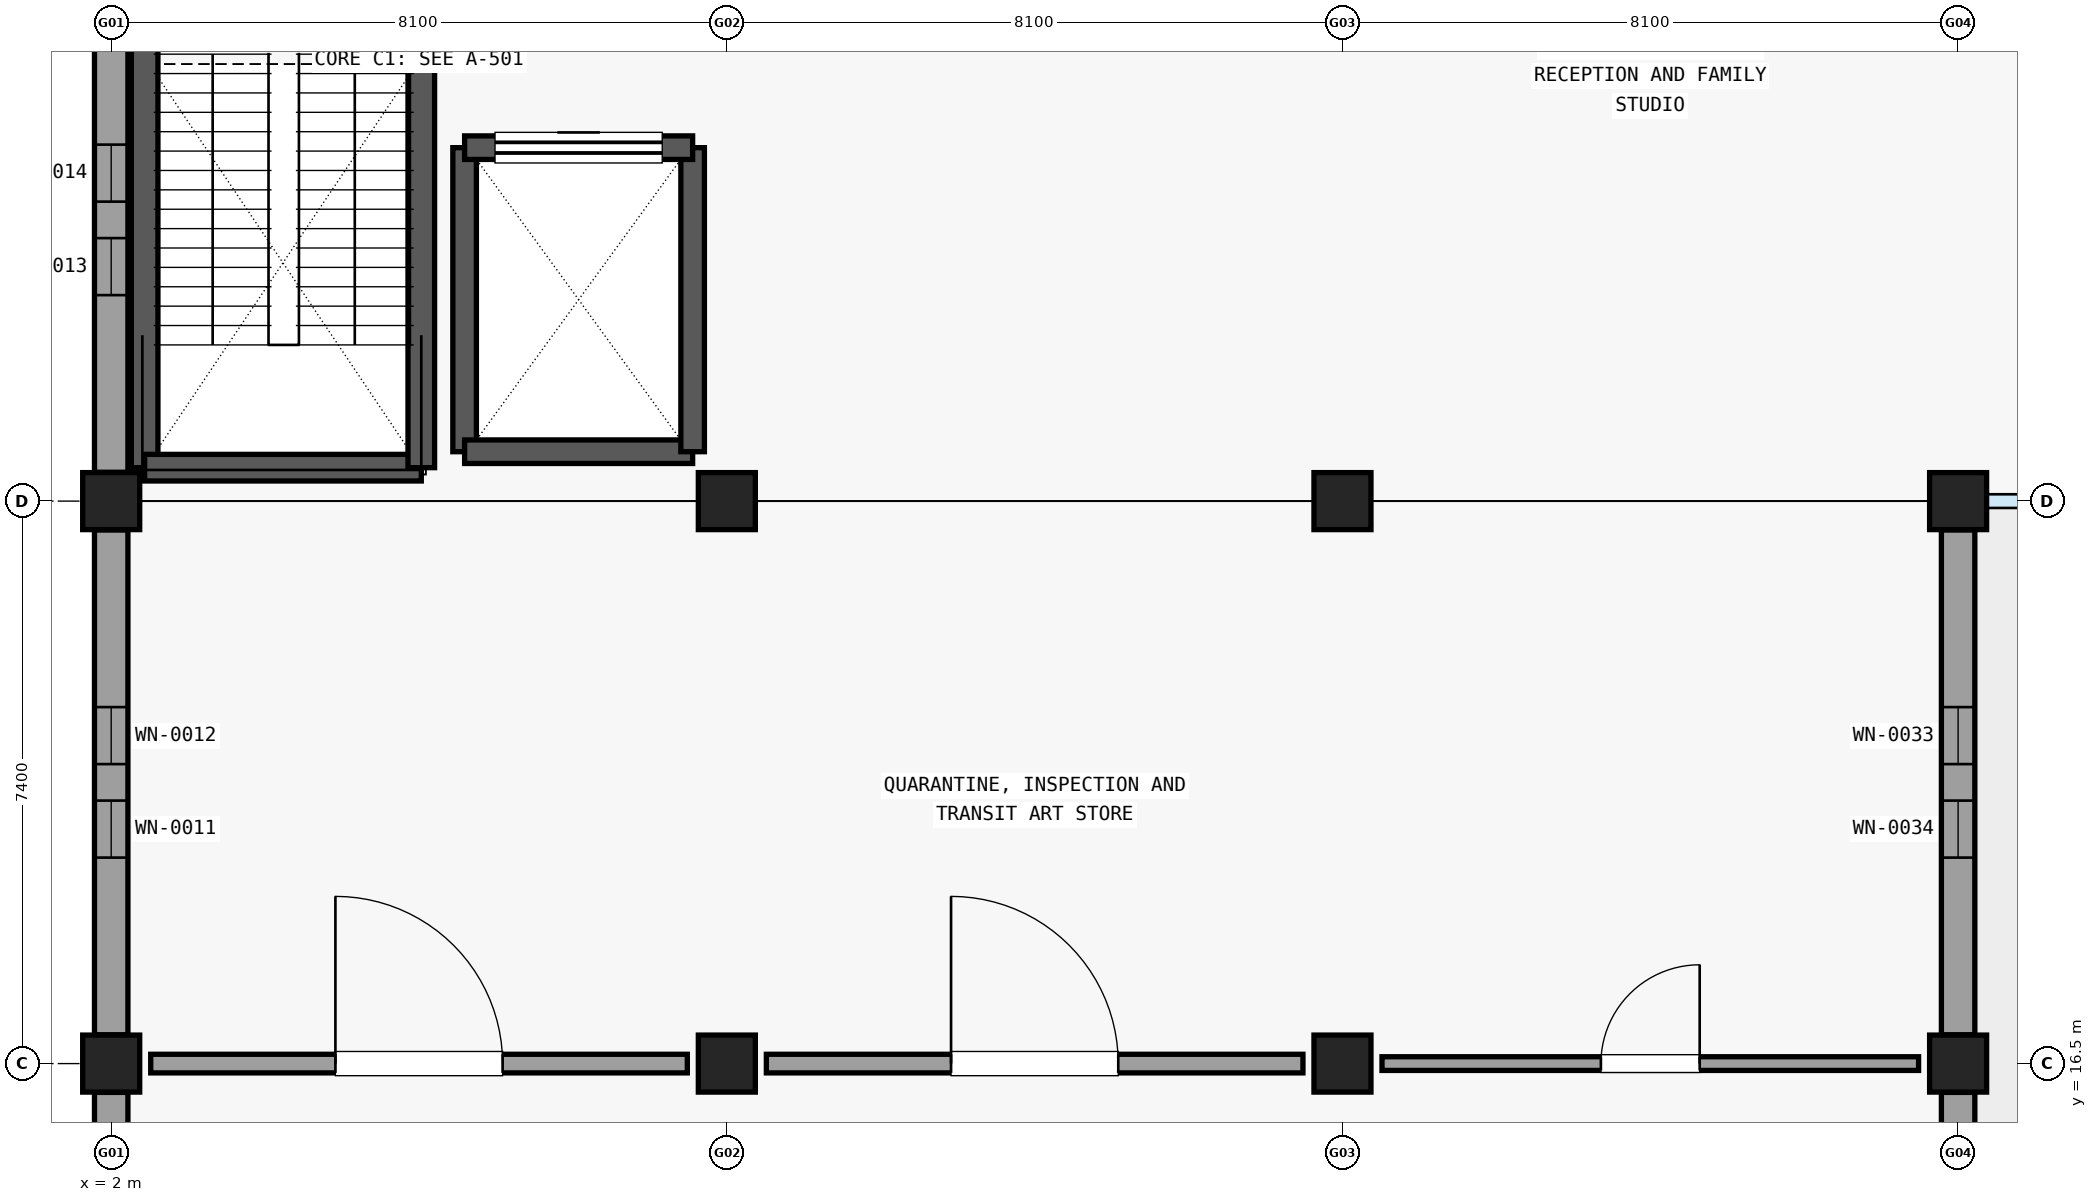
"""IFC4 building model, lengths in metres.
Left out: names, types, materials, properties, quantities, classifications, styles, units other than length and angle.
Written with IfcOpenShell. Run it as: python <this file> out.ifc"""

import sys

from ifc_helpers import new_model, si_unit, direction, frame, frame_2d, origin, origin_2d, place, context, subcontext, project, spatial, rectangle, extrude, element, fill, save


model = new_model("IFC4")
c1 = context("Model", 3, precision=1e-05, world=origin(), true_north=direction((0.0, 1.0)))
c2 = subcontext(c1, "Body", "Model", "MODEL_VIEW")
j1 = project(units=[si_unit("LENGTHUNIT", "METRE"), si_unit("PLANEANGLEUNIT", "RADIAN")], contexts=[c1])
p1 = place(None, origin())
s1 = spatial("IfcSite", under=j1, at=p1, CompositionType="ELEMENT")
p2 = place(p1, origin())
s2 = spatial("IfcBuilding", under=s1, at=p2, CompositionType="ELEMENT")
p3 = place(p2, origin())
s3 = spatial("IfcBuildingStorey", under=s2, at=p3, CompositionType="ELEMENT", Elevation=0.0)
p4 = place(p3, frame((2.0, 16.5, -0.28), z_axis=(0.0, 0.0, 1.0), x_axis=(1.0, 0.0, 0.0)))
e1 = element("IfcColumn", 1, at=p4, inside=s3, PredefinedType="COLUMN", context=c2, shape_type="SweptSolid", body=[
    extrude(rectangle(XDim=0.75, YDim=0.75, at=origin_2d()), origin(), (0.0, 0.0, 1.0), 5.415),
])
p5 = place(p3, frame((2.0, 23.9, 0.0), z_axis=(0.0, 0.0, 1.0), x_axis=(1.0, 0.0, 0.0)))
e2 = element("IfcColumn", 2, at=p5, inside=s3, PredefinedType="COLUMN", context=c2, shape_type="SweptSolid", body=[
    extrude(rectangle(XDim=0.75, YDim=0.75, at=origin_2d()), origin(), (0.0, 0.0, 1.0), 5.135),
])
p6 = place(p3, frame((10.1, 16.5, -0.28), z_axis=(0.0, 0.0, 1.0), x_axis=(1.0, 0.0, 0.0)))
e3 = element("IfcColumn", 3, at=p6, inside=s3, PredefinedType="COLUMN", context=c2, shape_type="SweptSolid", body=[
    extrude(rectangle(XDim=0.75, YDim=0.75, at=origin_2d()), origin(), (0.0, 0.0, 1.0), 5.415),
])
p7 = place(p3, frame((10.1, 23.9, 0.0), z_axis=(0.0, 0.0, 1.0), x_axis=(1.0, 0.0, 0.0)))
e4 = element("IfcColumn", 4, at=p7, inside=s3, PredefinedType="COLUMN", context=c2, shape_type="SweptSolid", body=[
    extrude(rectangle(XDim=0.75, YDim=0.75, at=origin_2d()), origin(), (0.0, 0.0, 1.0), 5.135),
])
p8 = place(p3, frame((18.2, 16.5, -0.28), z_axis=(0.0, 0.0, 1.0), x_axis=(1.0, 0.0, 0.0)))
e5 = element("IfcColumn", 5, at=p8, inside=s3, PredefinedType="COLUMN", context=c2, shape_type="SweptSolid", body=[
    extrude(rectangle(XDim=0.75, YDim=0.75, at=origin_2d()), origin(), (0.0, 0.0, 1.0), 5.415),
])
p9 = place(p3, frame((18.2, 23.9, 0.0), z_axis=(0.0, 0.0, 1.0), x_axis=(1.0, 0.0, 0.0)))
e6 = element("IfcColumn", 6, at=p9, inside=s3, PredefinedType="COLUMN", context=c2, shape_type="SweptSolid", body=[
    extrude(rectangle(XDim=0.75, YDim=0.75, at=origin_2d()), origin(), (0.0, 0.0, 1.0), 5.135),
])
p10 = place(p3, frame((26.3, 16.5, -0.28), z_axis=(0.0, 0.0, 1.0), x_axis=(1.0, 0.0, 0.0)))
e7 = element("IfcColumn", 7, at=p10, inside=s3, PredefinedType="COLUMN", context=c2, shape_type="SweptSolid", body=[
    extrude(rectangle(XDim=0.75, YDim=0.75, at=origin_2d()), origin(), (0.0, 0.0, 1.0), 5.415),
])
p11 = place(p3, frame((26.3, 23.9, 0.0), z_axis=(0.0, 0.0, 1.0), x_axis=(1.0, 0.0, 0.0)))
e8 = element("IfcColumn", 8, at=p11, inside=s3, PredefinedType="COLUMN", context=c2, shape_type="SweptSolid", body=[
    extrude(rectangle(XDim=0.75, YDim=0.75, at=origin_2d()), origin(), (0.0, 0.0, 1.0), 5.135),
])
p12 = place(p3, frame((2.0, 9.479, 0.0), z_axis=(0.0, 0.0, 1.0), x_axis=(0.0, 1.0, 0.0)))
e9 = element("IfcWall", 9, at=p12, inside=s3, PredefinedType="SOLIDWALL", context=c2, shape_type="SweptSolid", body=[
    extrude(rectangle(XDim=6.642, YDim=0.44, at=frame_2d((3.321, 0.0))), origin(), (0.0, 0.0, 1.0), 4.27),
])
p13 = place(p12, frame((2.331, 0.0, 0.65)))
e10 = element("IfcOpeningElement", 10, at=p13, cuts=e9, PredefinedType="OPENING", context=c2, shape_type="SweptSolid", body=[
    extrude(rectangle(XDim=0.75, YDim=3.1, at=frame_2d((0.375, 1.55))), frame((0.0, 0.23, 0.0), z_axis=(0.0, -1.0, 0.0), x_axis=(1.0, 0.0, 0.0)), (0.0, 0.0, 1.0), 0.46),
])
p14 = place(p12, frame((3.561, 0.0, 0.65)))
e11 = element("IfcOpeningElement", 11, at=p14, cuts=e9, PredefinedType="OPENING", context=c2, shape_type="SweptSolid", body=[
    extrude(rectangle(XDim=0.75, YDim=3.1, at=frame_2d((0.375, 1.55))), frame((0.0, 0.23, 0.0), z_axis=(0.0, -1.0, 0.0), x_axis=(1.0, 0.0, 0.0)), (0.0, 0.0, 1.0), 0.46),
])
p15 = place(p3, frame((2.0, 16.879, 0.0), z_axis=(0.0, 0.0, 1.0), x_axis=(0.0, 1.0, 0.0)))
e12 = element("IfcWall", 12, at=p15, inside=s3, PredefinedType="SOLIDWALL", context=c2, shape_type="SweptSolid", body=[
    extrude(rectangle(XDim=6.642, YDim=0.44, at=frame_2d((3.321, 0.0))), origin(), (0.0, 0.0, 1.0), 4.27),
])
p16 = place(p15, frame((2.331, 0.0, 0.65)))
e13 = element("IfcOpeningElement", 13, at=p16, cuts=e12, PredefinedType="OPENING", context=c2, shape_type="SweptSolid", body=[
    extrude(rectangle(XDim=0.75, YDim=3.1, at=frame_2d((0.375, 1.55))), frame((0.0, 0.23, 0.0), z_axis=(0.0, -1.0, 0.0), x_axis=(1.0, 0.0, 0.0)), (0.0, 0.0, 1.0), 0.46),
])
p17 = place(p15, frame((3.561, 0.0, 0.65)))
e14 = element("IfcOpeningElement", 14, at=p17, cuts=e12, PredefinedType="OPENING", context=c2, shape_type="SweptSolid", body=[
    extrude(rectangle(XDim=0.75, YDim=3.1, at=frame_2d((0.375, 1.55))), frame((0.0, 0.23, 0.0), z_axis=(0.0, -1.0, 0.0), x_axis=(1.0, 0.0, 0.0)), (0.0, 0.0, 1.0), 0.46),
])
p18 = place(p3, frame((2.0, 24.279, 0.0), z_axis=(0.0, 0.0, 1.0), x_axis=(0.0, 1.0, 0.0)))
e15 = element("IfcWall", 15, at=p18, inside=s3, PredefinedType="SOLIDWALL", context=c2, shape_type="SweptSolid", body=[
    extrude(rectangle(XDim=6.642, YDim=0.44, at=frame_2d((3.321, 0.0))), origin(), (0.0, 0.0, 1.0), 4.27),
])
p19 = place(p18, frame((2.331, 0.0, 0.65)))
e16 = element("IfcOpeningElement", 16, at=p19, cuts=e15, PredefinedType="OPENING", context=c2, shape_type="SweptSolid", body=[
    extrude(rectangle(XDim=0.75, YDim=3.1, at=frame_2d((0.375, 1.55))), frame((0.0, 0.23, 0.0), z_axis=(0.0, -1.0, 0.0), x_axis=(1.0, 0.0, 0.0)), (0.0, 0.0, 1.0), 0.46),
])
p20 = place(p18, frame((3.561, 0.0, 0.65)))
e17 = element("IfcOpeningElement", 17, at=p20, cuts=e15, PredefinedType="OPENING", context=c2, shape_type="SweptSolid", body=[
    extrude(rectangle(XDim=0.75, YDim=3.1, at=frame_2d((0.375, 1.55))), frame((0.0, 0.23, 0.0), z_axis=(0.0, -1.0, 0.0), x_axis=(1.0, 0.0, 0.0)), (0.0, 0.0, 1.0), 0.46),
])
p21 = place(p3, frame((26.3, 16.121, 0.0), z_axis=(0.0, 0.0, 1.0), x_axis=(0.0, -1.0, 0.0)))
e18 = element("IfcWall", 18, at=p21, inside=s3, PredefinedType="SOLIDWALL", context=c2, shape_type="SweptSolid", body=[
    extrude(rectangle(XDim=6.642, YDim=0.44, at=frame_2d((3.321, 0.0))), origin(), (0.0, 0.0, 1.0), 4.27),
])
p22 = place(p21, frame((2.221, 0.0, 0.0)))
e19 = element("IfcOpeningElement", 19, at=p22, cuts=e18, PredefinedType="OPENING", context=c2, shape_type="SweptSolid", body=[
    extrude(rectangle(XDim=2.2, YDim=2.4, at=frame_2d((1.1, 1.2))), frame((0.0, 0.23, 0.0), z_axis=(0.0, -1.0, 0.0), x_axis=(1.0, 0.0, 0.0)), (0.0, 0.0, 1.0), 0.46),
])
p23 = place(p3, frame((26.3, 23.521, 0.0), z_axis=(0.0, 0.0, 1.0), x_axis=(0.0, -1.0, 0.0)))
e20 = element("IfcWall", 20, at=p23, inside=s3, PredefinedType="SOLIDWALL", context=c2, shape_type="SweptSolid", body=[
    extrude(rectangle(XDim=6.642, YDim=0.44, at=frame_2d((3.321, 0.0))), origin(), (0.0, 0.0, 1.0), 4.27),
])
p24 = place(p23, frame((2.331, 0.0, 0.65)))
e21 = element("IfcOpeningElement", 21, at=p24, cuts=e20, PredefinedType="OPENING", context=c2, shape_type="SweptSolid", body=[
    extrude(rectangle(XDim=0.75, YDim=3.1, at=frame_2d((0.375, 1.55))), frame((0.0, 0.23, 0.0), z_axis=(0.0, -1.0, 0.0), x_axis=(1.0, 0.0, 0.0)), (0.0, 0.0, 1.0), 0.46),
])
p25 = place(p23, frame((3.561, 0.0, 0.65)))
e22 = element("IfcOpeningElement", 22, at=p25, cuts=e20, PredefinedType="OPENING", context=c2, shape_type="SweptSolid", body=[
    extrude(rectangle(XDim=0.75, YDim=3.1, at=frame_2d((0.375, 1.55))), frame((0.0, 0.23, 0.0), z_axis=(0.0, -1.0, 0.0), x_axis=(1.0, 0.0, 0.0)), (0.0, 0.0, 1.0), 0.46),
])
p26 = place(p3, frame((2.44, 24.34, 0.0), z_axis=(0.0, 0.0, 1.0), x_axis=(0.0, 1.0, 0.0)))
e23 = element("IfcWall", 23, at=p26, inside=s3, PredefinedType="SHEAR", context=c2, shape_type="SweptSolid", body=[
    extrude(rectangle(XDim=6.52, YDim=0.35, at=frame_2d((3.26, 0.0))), origin(), (0.0, 0.0, 1.0), 5.13),
])
p27 = place(p3, frame((2.44, 24.34, 0.0), z_axis=(0.0, 0.0, 1.0), x_axis=(1.0, 0.0, 0.0)))
e24 = element("IfcWall", 24, at=p27, inside=s3, PredefinedType="SHEAR", context=c2, shape_type="SweptSolid", body=[
    extrude(rectangle(XDim=3.64, YDim=0.35, at=frame_2d((1.82, 0.0))), origin(), (0.0, 0.0, 1.0), 5.13),
])
p28 = place(p3, frame((6.08, 24.34, 0.0), z_axis=(0.0, 0.0, 1.0), x_axis=(0.0, 1.0, 0.0)))
e25 = element("IfcWall", 25, at=p28, inside=s3, PredefinedType="SHEAR", context=c2, shape_type="SweptSolid", body=[
    extrude(rectangle(XDim=6.52, YDim=0.35, at=frame_2d((3.26, 0.0))), origin(), (0.0, 0.0, 1.0), 5.13),
])
p29 = place(p3, frame((6.65, 24.55, 0.0), z_axis=(0.0, 0.0, 1.0), x_axis=(0.0, 1.0, 0.0)))
e26 = element("IfcWall", 26, at=p29, inside=s3, PredefinedType="SHEAR", context=c2, shape_type="SweptSolid", body=[
    extrude(rectangle(XDim=4.0, YDim=0.31, at=frame_2d((2.0, 0.0))), origin(), (0.0, 0.0, 1.0), 5.13),
])
p30 = place(p3, frame((6.65, 24.55, 0.0), z_axis=(0.0, 0.0, 1.0), x_axis=(1.0, 0.0, 0.0)))
e27 = element("IfcWall", 27, at=p30, inside=s3, PredefinedType="SHEAR", context=c2, shape_type="SweptSolid", body=[
    extrude(rectangle(XDim=3.0, YDim=0.31, at=frame_2d((1.5, 0.0))), origin(), (0.0, 0.0, 1.0), 5.13),
])
p31 = place(p3, frame((9.65, 24.55, 0.0), z_axis=(0.0, 0.0, 1.0), x_axis=(0.0, 1.0, 0.0)))
e28 = element("IfcWall", 28, at=p31, inside=s3, PredefinedType="SHEAR", context=c2, shape_type="SweptSolid", body=[
    extrude(rectangle(XDim=4.0, YDim=0.31, at=frame_2d((2.0, 0.0))), origin(), (0.0, 0.0, 1.0), 5.13),
])
p32 = place(p3, frame((6.65, 28.55, 0.0), z_axis=(0.0, 0.0, 1.0), x_axis=(1.0, 0.0, 0.0)))
e29 = element("IfcWall", 29, at=p32, inside=s3, PredefinedType="SHEAR", context=c2, shape_type="SweptSolid", body=[
    extrude(rectangle(XDim=3.0, YDim=0.31, at=frame_2d((1.5, 0.0))), origin(), (0.0, 0.0, 1.0), 5.13),
])
p33 = place(p32, frame((0.4, 0.0, 0.0)))
e30 = element("IfcOpeningElement", 30, at=p33, cuts=e29, PredefinedType="OPENING", context=c2, shape_type="SweptSolid", body=[
    extrude(rectangle(XDim=2.2, YDim=2.55, at=frame_2d((1.1, 1.275))), frame((0.0, 0.165, 0.0), z_axis=(0.0, -1.0, 0.0), x_axis=(1.0, 0.0, 0.0)), (0.0, 0.0, 1.0), 0.33),
])
p34 = place(p3, frame((2.52, 16.5, 0.0), z_axis=(0.0, 0.0, 1.0), x_axis=(1.0, 0.0, 0.0)))
e31 = element("IfcWall", 31, at=p34, inside=s3, PredefinedType="PARTITIONING", context=c2, shape_type="SweptSolid", body=[
    extrude(rectangle(XDim=7.06, YDim=0.245, at=frame_2d((3.53, 0.0))), origin(), (0.0, 0.0, 1.0), 4.275),
])
p35 = place(p34, frame((2.43, 0.0, 0.0)))
e32 = element("IfcOpeningElement", 32, at=p35, cuts=e31, PredefinedType="OPENING", context=c2, shape_type="SweptSolid", body=[
    extrude(rectangle(XDim=2.2, YDim=2.65, at=frame_2d((1.1, 1.325))), frame((0.0, 0.133, 0.0), z_axis=(0.0, -1.0, 0.0), x_axis=(1.0, 0.0, 0.0)), (0.0, 0.0, 1.0), 0.265),
])
p36 = place(p3, frame((10.62, 16.5, 0.0), z_axis=(0.0, 0.0, 1.0), x_axis=(1.0, 0.0, 0.0)))
e33 = element("IfcWall", 33, at=p36, inside=s3, PredefinedType="PARTITIONING", context=c2, shape_type="SweptSolid", body=[
    extrude(rectangle(XDim=7.06, YDim=0.245, at=frame_2d((3.53, 0.0))), origin(), (0.0, 0.0, 1.0), 4.275),
])
p37 = place(p36, frame((2.43, 0.0, 0.0)))
e34 = element("IfcOpeningElement", 34, at=p37, cuts=e33, PredefinedType="OPENING", context=c2, shape_type="SweptSolid", body=[
    extrude(rectangle(XDim=2.2, YDim=2.65, at=frame_2d((1.1, 1.325))), frame((0.0, 0.133, 0.0), z_axis=(0.0, -1.0, 0.0), x_axis=(1.0, 0.0, 0.0)), (0.0, 0.0, 1.0), 0.265),
])
p38 = place(p3, frame((18.72, 16.5, 0.0), z_axis=(0.0, 0.0, 1.0), x_axis=(1.0, 0.0, 0.0)))
e35 = element("IfcWall", 35, at=p38, inside=s3, PredefinedType="PARTITIONING", context=c2, shape_type="SweptSolid", body=[
    extrude(rectangle(XDim=7.06, YDim=0.18, at=frame_2d((3.53, 0.0))), origin(), (0.0, 0.0, 1.0), 4.275),
])
p39 = place(p38, frame((2.88, 0.0, 0.0)))
e36 = element("IfcOpeningElement", 36, at=p39, cuts=e35, PredefinedType="OPENING", context=c2, shape_type="SweptSolid", body=[
    extrude(rectangle(XDim=1.3, YDim=2.2, at=frame_2d((0.65, 1.1))), frame((0.0, 0.1, 0.0), z_axis=(0.0, -1.0, 0.0), x_axis=(1.0, 0.0, 0.0)), (0.0, 0.0, 1.0), 0.2),
])
p40 = place(p16, origin())
e37 = element("IfcWindow", 37, at=p40, inside=s3, PartitioningType="SINGLE_PANEL", PredefinedType="WINDOW", context=c2, shape_type="SweptSolid", body=[
    extrude(rectangle(XDim=0.75, YDim=3.1, at=frame_2d((0.375, 1.55))), frame((0.0, 0.03, 0.0), z_axis=(0.0, -1.0, 0.0), x_axis=(1.0, 0.0, 0.0)), (0.0, 0.0, 1.0), 0.06),
])
fill(e13, e37)
p41 = place(p17, origin())
e38 = element("IfcWindow", 38, at=p41, inside=s3, PartitioningType="SINGLE_PANEL", PredefinedType="WINDOW", context=c2, shape_type="SweptSolid", body=[
    extrude(rectangle(XDim=0.75, YDim=3.1, at=frame_2d((0.375, 1.55))), frame((0.0, 0.03, 0.0), z_axis=(0.0, -1.0, 0.0), x_axis=(1.0, 0.0, 0.0)), (0.0, 0.0, 1.0), 0.06),
])
fill(e14, e38)
p42 = place(p19, origin())
e39 = element("IfcWindow", 39, at=p42, inside=s3, PartitioningType="SINGLE_PANEL", PredefinedType="WINDOW", context=c2, shape_type="SweptSolid", body=[
    extrude(rectangle(XDim=0.75, YDim=3.1, at=frame_2d((0.375, 1.55))), frame((0.0, 0.03, 0.0), z_axis=(0.0, -1.0, 0.0), x_axis=(1.0, 0.0, 0.0)), (0.0, 0.0, 1.0), 0.06),
])
fill(e16, e39)
p43 = place(p20, origin())
e40 = element("IfcWindow", 40, at=p43, inside=s3, PartitioningType="SINGLE_PANEL", PredefinedType="WINDOW", context=c2, shape_type="SweptSolid", body=[
    extrude(rectangle(XDim=0.75, YDim=3.1, at=frame_2d((0.375, 1.55))), frame((0.0, 0.03, 0.0), z_axis=(0.0, -1.0, 0.0), x_axis=(1.0, 0.0, 0.0)), (0.0, 0.0, 1.0), 0.06),
])
fill(e17, e40)
p44 = place(p24, origin())
e41 = element("IfcWindow", 41, at=p44, inside=s3, PartitioningType="SINGLE_PANEL", PredefinedType="WINDOW", context=c2, shape_type="SweptSolid", body=[
    extrude(rectangle(XDim=0.75, YDim=3.1, at=frame_2d((0.375, 1.55))), frame((0.0, 0.03, 0.0), z_axis=(0.0, -1.0, 0.0), x_axis=(1.0, 0.0, 0.0)), (0.0, 0.0, 1.0), 0.06),
])
fill(e21, e41)
p45 = place(p25, origin())
e42 = element("IfcWindow", 42, at=p45, inside=s3, PartitioningType="SINGLE_PANEL", PredefinedType="WINDOW", context=c2, shape_type="SweptSolid", body=[
    extrude(rectangle(XDim=0.75, YDim=3.1, at=frame_2d((0.375, 1.55))), frame((0.0, 0.03, 0.0), z_axis=(0.0, -1.0, 0.0), x_axis=(1.0, 0.0, 0.0)), (0.0, 0.0, 1.0), 0.06),
])
fill(e22, e42)
p46 = place(p33, origin())
e43 = element("IfcDoor", 43, at=p46, inside=s3, OperationType="SLIDING_TO_RIGHT", PredefinedType="DOOR", context=c2, shape_type="SweptSolid", body=[
    extrude(rectangle(XDim=2.2, YDim=2.55, at=frame_2d((1.1, 1.275))), frame((0.0, 0.025, 0.0), z_axis=(0.0, -1.0, 0.0), x_axis=(1.0, 0.0, 0.0)), (0.0, 0.0, 1.0), 0.05),
])
fill(e30, e43)
p47 = place(p35, origin())
e44 = element("IfcDoor", 44, at=p47, inside=s3, OperationType="SINGLE_SWING_LEFT", PredefinedType="DOOR", context=c2, shape_type="SweptSolid", body=[
    extrude(rectangle(XDim=2.2, YDim=2.65, at=frame_2d((1.1, 1.325))), frame((0.0, 0.025, 0.0), z_axis=(0.0, -1.0, 0.0), x_axis=(1.0, 0.0, 0.0)), (0.0, 0.0, 1.0), 0.05),
])
fill(e32, e44)
p48 = place(p37, origin())
e45 = element("IfcDoor", 45, at=p48, inside=s3, OperationType="SINGLE_SWING_LEFT", PredefinedType="DOOR", context=c2, shape_type="SweptSolid", body=[
    extrude(rectangle(XDim=2.2, YDim=2.65, at=frame_2d((1.1, 1.325))), frame((0.0, 0.025, 0.0), z_axis=(0.0, -1.0, 0.0), x_axis=(1.0, 0.0, 0.0)), (0.0, 0.0, 1.0), 0.05),
])
fill(e34, e45)
p49 = place(p39, origin())
e46 = element("IfcDoor", 46, at=p49, inside=s3, OperationType="SINGLE_SWING_RIGHT", PredefinedType="DOOR", context=c2, shape_type="SweptSolid", body=[
    extrude(rectangle(XDim=1.3, YDim=2.2, at=frame_2d((0.65, 1.1))), frame((0.0, 0.025, 0.0), z_axis=(0.0, -1.0, 0.0), x_axis=(1.0, 0.0, 0.0)), (0.0, 0.0, 1.0), 0.05),
])
fill(e36, e46)
save(model, sys.argv[1])
